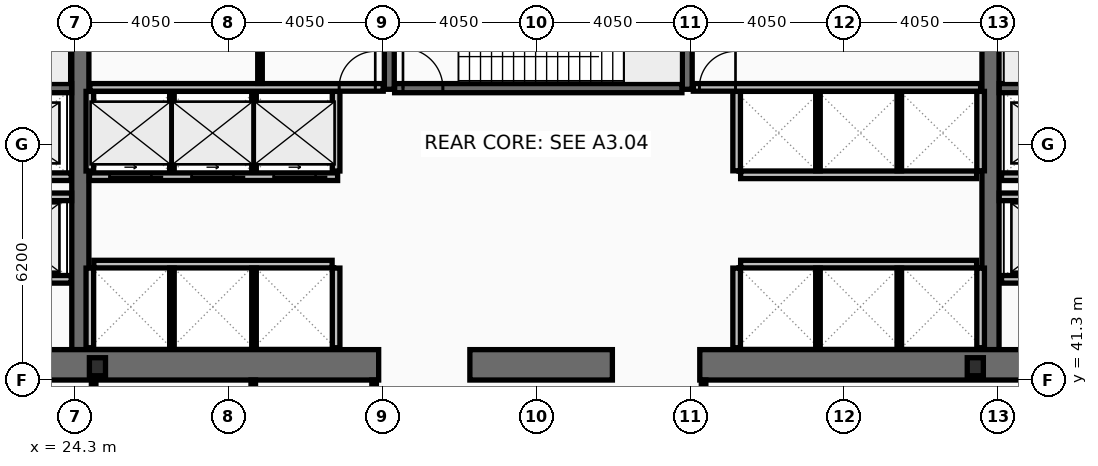
"""IFC4 building model, lengths in metres.
Left out: names, types, materials, properties, quantities, classifications, styles, units other than length and angle.
Written with IfcOpenShell. Run it as: python <this file> out.ifc"""

import sys

from ifc_helpers import new_model, si_unit, direction, frame, frame_2d, origin, origin_2d, place, context, subcontext, project, spatial, rectangle, i_section, extrude, element, fill, save


model = new_model("IFC4")
c1 = context("Model", 3, precision=1e-05, world=origin(), true_north=direction((0.0, 1.0)))
c2 = subcontext(c1, "Body", "Model", "MODEL_VIEW")
j1 = project(units=[si_unit("LENGTHUNIT", "METRE"), si_unit("PLANEANGLEUNIT", "RADIAN")], contexts=[c1])
p1 = place(None, origin())
s1 = spatial("IfcSite", under=j1, at=p1, CompositionType="ELEMENT")
p2 = place(p1, origin())
s2 = spatial("IfcBuilding", under=s1, at=p2, CompositionType="ELEMENT")
p3 = place(p2, frame((0.0, 0.0, 20.4)))
s3 = spatial("IfcBuildingStorey", under=s2, at=p3, CompositionType="ELEMENT", Elevation=20.4)
for number, where, z_axis, x_axis in (
    (1, (24.45, 42.1, 0.0), (0.0, 0.0, 1.0), (0.0, 1.0, 0.0)),
    (2, (48.4, 42.1, 0.0), (0.0, 0.0, 1.0), (0.0, 1.0, 0.0)),
):
    element("IfcWall", number, at=place(p3, frame(where, z_axis=z_axis, x_axis=x_axis)), inside=s3, PredefinedType="SHEAR", context=c2, shape_type="SweptSolid", body=[
        extrude(rectangle(XDim=10.8, YDim=0.45, at=frame_2d((5.4, 0.0))), origin(), (0.0, 0.0, 1.0), 5.22),
    ])
p4 = place(p3, frame((32.3, 41.7, 0.0), z_axis=(0.0, 0.0, 1.0), x_axis=(-1.0, 0.0, 0.0)))
e3 = element("IfcWall", 3, at=p4, inside=s3, PredefinedType="SHEAR", context=c2, shape_type="SweptSolid", body=[
    extrude(rectangle(XDim=11.45, YDim=0.8, at=frame_2d((5.725, 0.0))), origin(), (0.0, 0.0, 1.0), 5.22),
])
p5 = place(p3, frame((38.45, 41.7, 0.0), z_axis=(0.0, 0.0, 1.0), x_axis=(-1.0, 0.0, 0.0)))
e4 = element("IfcWall", 4, at=p5, inside=s3, PredefinedType="SHEAR", context=c2, shape_type="SweptSolid", body=[
    extrude(rectangle(XDim=3.75, YDim=0.8, at=frame_2d((1.875, 0.0))), origin(), (0.0, 0.0, 1.0), 5.22),
])
p6 = place(p3, frame((52.05, 41.7, 0.0), z_axis=(0.0, 0.0, 1.0), x_axis=(-1.0, 0.0, 0.0)))
e5 = element("IfcWall", 5, at=p6, inside=s3, PredefinedType="SHEAR", context=c2, shape_type="SweptSolid", body=[
    extrude(rectangle(XDim=11.3, YDim=0.8, at=frame_2d((5.65, 0.0))), origin(), (0.0, 0.0, 1.0), 5.22),
])
for number, where, z_axis, x_axis in (
    (6, (32.58, 48.95, 0.0), (0.0, 0.0, 1.0), (0.0, 1.0, 0.0)),
    (7, (40.42, 48.95, 0.0), (0.0, 0.0, 1.0), (0.0, 1.0, 0.0)),
):
    element("IfcWall", number, at=place(p3, frame(where, z_axis=z_axis, x_axis=x_axis)), inside=s3, PredefinedType="SHEAR", context=c2, shape_type="SweptSolid", body=[
        extrude(rectangle(XDim=3.95, YDim=0.26, at=frame_2d((1.975, 0.0))), origin(), (0.0, 0.0, 1.0), 5.22),
    ])
p7 = place(p3, frame((17.0, 48.98, 0.0), z_axis=(0.0, 0.0, 1.0), x_axis=(1.0, 0.0, 0.0)))
e8 = element("IfcWall", 8, at=p7, inside=s3, PredefinedType="SHEAR", context=c2, shape_type="SweptSolid", body=[
    extrude(rectangle(XDim=7.22, YDim=0.24, at=frame_2d((3.61, 0.0))), origin(), (0.0, 0.0, 1.0), 5.22),
])
p8 = place(p7, frame((0.22, 0.0, 0.0)))
e9 = element("IfcOpeningElement", 9, at=p8, cuts=e8, PredefinedType="OPENING", context=c2, shape_type="SweptSolid", body=[
    extrude(rectangle(XDim=1.05, YDim=2.15, at=frame_2d((0.525, 1.075))), frame((0.0, 0.13, 0.0), z_axis=(0.0, -1.0, 0.0), x_axis=(1.0, 0.0, 0.0)), (0.0, 0.0, 1.0), 0.26),
])
p9 = place(p3, frame((48.63, 48.98, 0.0), z_axis=(0.0, 0.0, 1.0), x_axis=(1.0, 0.0, 0.0)))
e10 = element("IfcWall", 10, at=p9, inside=s3, PredefinedType="SHEAR", context=c2, shape_type="SweptSolid", body=[
    extrude(rectangle(XDim=7.27, YDim=0.24, at=frame_2d((3.635, 0.0))), origin(), (0.0, 0.0, 1.0), 5.22),
])
p10 = place(p9, frame((6.0, 0.0, 0.0)))
e11 = element("IfcOpeningElement", 11, at=p10, cuts=e10, PredefinedType="OPENING", context=c2, shape_type="SweptSolid", body=[
    extrude(rectangle(XDim=1.05, YDim=2.15, at=frame_2d((0.525, 1.075))), frame((0.0, 0.13, 0.0), z_axis=(0.0, -1.0, 0.0), x_axis=(1.0, 0.0, 0.0)), (0.0, 0.0, 1.0), 0.26),
])
p11 = place(p3, frame((32.72, 48.98, 0.0), z_axis=(0.0, 0.0, 1.0), x_axis=(1.0, 0.0, 0.0)))
e12 = element("IfcWall", 12, at=p11, inside=s3, PredefinedType="SHEAR", context=c2, shape_type="SweptSolid", body=[
    extrude(rectangle(XDim=7.56, YDim=0.24, at=frame_2d((3.78, 0.0))), origin(), (0.0, 0.0, 1.0), 5.22),
])
p12 = place(p11, frame((0.22, 0.0, 0.0)))
e13 = element("IfcOpeningElement", 13, at=p12, cuts=e12, PredefinedType="OPENING", context=c2, shape_type="SweptSolid", body=[
    extrude(rectangle(XDim=1.05, YDim=2.15, at=frame_2d((0.525, 1.075))), frame((0.0, 0.13, 0.0), z_axis=(0.0, -1.0, 0.0), x_axis=(1.0, 0.0, 0.0)), (0.0, 0.0, 1.0), 0.26),
])
for number, where, z_axis, x_axis in (
    (14, (24.9, 41.65, 0.0), (0.0, 0.0, 1.0), (1.0, 0.0, 0.0)),
    (15, (48.0, 41.65, 0.0), (0.0, 0.0, 1.0), (1.0, 0.0, 0.0)),
):
    element("IfcColumn", number, at=place(p3, frame(where, z_axis=z_axis, x_axis=x_axis)), inside=s3, PredefinedType="COLUMN", context=c2, shape_type="SweptSolid", body=[
        extrude(i_section(OverallWidth=0.424, OverallDepth=0.474, WebThickness=0.048, FlangeThickness=0.077, at=origin_2d()), origin(), (0.0, 0.0, 1.0), 5.4),
    ])
p13 = place(p3, frame((51.61, 43.95, 0.0), z_axis=(0.0, 0.0, 1.0), x_axis=(-1.0, 0.0, 0.0)))
e16 = element("IfcWall", 16, at=p13, inside=s3, PredefinedType="PARTITIONING", context=c2, shape_type="SweptSolid", body=[
    extrude(rectangle(XDim=2.92, YDim=0.2, at=frame_2d((1.46, 0.0))), origin(), (0.0, 0.0, 1.0), 5.22),
])
p14 = place(p13, frame((0.81, 0.0, 0.0)))
e17 = element("IfcOpeningElement", 17, at=p14, cuts=e16, PredefinedType="OPENING", context=c2, shape_type="SweptSolid", body=[
    extrude(rectangle(XDim=1.3, YDim=2.18, at=frame_2d((0.65, 1.09))), frame((0.0, 0.11, 0.0), z_axis=(0.0, -1.0, 0.0), x_axis=(1.0, 0.0, 0.0)), (0.0, 0.0, 1.0), 0.22),
])
p15 = place(p3, frame((24.21, 43.95, 0.0), z_axis=(0.0, 0.0, 1.0), x_axis=(-1.0, 0.0, 0.0)))
e18 = element("IfcWall", 18, at=p15, inside=s3, PredefinedType="PARTITIONING", context=c2, shape_type="SweptSolid", body=[
    extrude(rectangle(XDim=2.97, YDim=0.2, at=frame_2d((1.485, 0.0))), origin(), (0.0, 0.0, 1.0), 5.22),
])
p16 = place(p15, frame((0.86, 0.0, 0.0)))
e19 = element("IfcOpeningElement", 19, at=p16, cuts=e18, PredefinedType="OPENING", context=c2, shape_type="SweptSolid", body=[
    extrude(rectangle(XDim=1.3, YDim=2.18, at=frame_2d((0.65, 1.09))), frame((0.0, 0.11, 0.0), z_axis=(0.0, -1.0, 0.0), x_axis=(1.0, 0.0, 0.0)), (0.0, 0.0, 1.0), 0.22),
])
p17 = place(p3, frame((51.61, 46.65, 0.0), z_axis=(0.0, 0.0, 1.0), x_axis=(-1.0, 0.0, 0.0)))
e20 = element("IfcWall", 20, at=p17, inside=s3, PredefinedType="PARTITIONING", context=c2, shape_type="SweptSolid", body=[
    extrude(rectangle(XDim=2.92, YDim=0.2, at=frame_2d((1.46, 0.0))), origin(), (0.0, 0.0, 1.0), 5.22),
])
p18 = place(p17, frame((0.86, 0.0, 0.0)))
e21 = element("IfcOpeningElement", 21, at=p18, cuts=e20, PredefinedType="OPENING", context=c2, shape_type="SweptSolid", body=[
    extrude(rectangle(XDim=1.2, YDim=2.18, at=frame_2d((0.6, 1.09))), frame((0.0, 0.11, 0.0), z_axis=(0.0, -1.0, 0.0), x_axis=(1.0, 0.0, 0.0)), (0.0, 0.0, 1.0), 0.22),
])
p19 = place(p3, frame((24.21, 46.65, 0.0), z_axis=(0.0, 0.0, 1.0), x_axis=(-1.0, 0.0, 0.0)))
e22 = element("IfcWall", 22, at=p19, inside=s3, PredefinedType="PARTITIONING", context=c2, shape_type="SweptSolid", body=[
    extrude(rectangle(XDim=2.97, YDim=0.2, at=frame_2d((1.485, 0.0))), origin(), (0.0, 0.0, 1.0), 5.22),
])
p20 = place(p19, frame((0.91, 0.0, 0.0)))
e23 = element("IfcOpeningElement", 23, at=p20, cuts=e22, PredefinedType="OPENING", context=c2, shape_type="SweptSolid", body=[
    extrude(rectangle(XDim=1.2, YDim=2.18, at=frame_2d((0.6, 1.09))), frame((0.0, 0.11, 0.0), z_axis=(0.0, -1.0, 0.0), x_axis=(1.0, 0.0, 0.0)), (0.0, 0.0, 1.0), 0.22),
])
p21 = place(p3, frame((31.22, 46.65, 0.0), z_axis=(0.0, 0.0, 1.0), x_axis=(-1.0, 0.0, 0.0)))
e24 = element("IfcWall", 24, at=p21, inside=s3, PredefinedType="PARTITIONING", context=c2, shape_type="SweptSolid", body=[
    extrude(rectangle(XDim=6.53, YDim=0.2, at=frame_2d((3.265, 0.0))), origin(), (0.0, 0.0, 1.0), 5.22),
])
p22 = place(p21, frame((4.9, 0.0, 0.0)))
e25 = element("IfcOpeningElement", 25, at=p22, cuts=e24, PredefinedType="OPENING", context=c2, shape_type="SweptSolid", body=[
    extrude(rectangle(XDim=1.1, YDim=2.18, at=frame_2d((0.55, 1.09))), frame((0.0, 0.11, 0.0), z_axis=(0.0, -1.0, 0.0), x_axis=(1.0, 0.0, 0.0)), (0.0, 0.0, 1.0), 0.22),
])
p23 = place(p21, frame((2.74, 0.0, 0.0)))
e26 = element("IfcOpeningElement", 26, at=p23, cuts=e24, PredefinedType="OPENING", context=c2, shape_type="SweptSolid", body=[
    extrude(rectangle(XDim=1.1, YDim=2.18, at=frame_2d((0.55, 1.09))), frame((0.0, 0.11, 0.0), z_axis=(0.0, -1.0, 0.0), x_axis=(1.0, 0.0, 0.0)), (0.0, 0.0, 1.0), 0.22),
])
p24 = place(p21, frame((0.58, 0.0, 0.0)))
e27 = element("IfcOpeningElement", 27, at=p24, cuts=e24, PredefinedType="OPENING", context=c2, shape_type="SweptSolid", body=[
    extrude(rectangle(XDim=1.1, YDim=2.18, at=frame_2d((0.55, 1.09))), frame((0.0, 0.11, 0.0), z_axis=(0.0, -1.0, 0.0), x_axis=(1.0, 0.0, 0.0)), (0.0, 0.0, 1.0), 0.22),
])
p25 = place(p3, frame((21.2, 46.12, 0.0), z_axis=(0.0, 0.0, 1.0), x_axis=(1.0, 0.0, 0.0)))
e28 = element("IfcWall", 28, at=p25, inside=s3, PredefinedType="PARTITIONING", context=c2, shape_type="SweptSolid", body=[
    extrude(rectangle(XDim=3.02, YDim=0.2, at=frame_2d((1.51, 0.0))), origin(), (0.0, 0.0, 1.0), 5.22),
])
p26 = place(p3, frame((48.63, 46.12, 0.0), z_axis=(0.0, 0.0, 1.0), x_axis=(1.0, 0.0, 0.0)))
e29 = element("IfcWall", 29, at=p26, inside=s3, PredefinedType="PARTITIONING", context=c2, shape_type="SweptSolid", body=[
    extrude(rectangle(XDim=3.07, YDim=0.2, at=frame_2d((1.535, 0.0))), origin(), (0.0, 0.0, 1.0), 5.22),
])
for number, where, z_axis, x_axis in (
    (30, (24.7, 46.8, 0.0), (0.0, 0.0, 1.0), (0.0, 1.0, 0.0)),
    (31, (31.18, 46.8, 0.0), (0.0, 0.0, 1.0), (0.0, 1.0, 0.0)),
):
    element("IfcWall", number, at=place(p3, frame(where, z_axis=z_axis, x_axis=x_axis)), inside=s3, PredefinedType="PARTITIONING", context=c2, shape_type="SweptSolid", body=[
        extrude(rectangle(XDim=2.095, YDim=0.2, at=frame_2d((1.047, 0.0))), origin(), (0.0, 0.0, 1.0), 5.22),
    ])
for number, where, z_axis, x_axis in (
    (32, (26.86, 46.8, 0.0), (0.0, 0.0, 1.0), (0.0, 1.0, 0.0)),
    (33, (29.02, 46.8, 0.0), (0.0, 0.0, 1.0), (0.0, 1.0, 0.0)),
):
    element("IfcWall", number, at=place(p3, frame(where, z_axis=z_axis, x_axis=x_axis)), inside=s3, PredefinedType="PARTITIONING", context=c2, shape_type="SweptSolid", body=[
        extrude(rectangle(XDim=2.095, YDim=0.12, at=frame_2d((1.047, 0.0))), origin(), (0.0, 0.0, 1.0), 5.22),
    ])
p27 = place(p3, frame((24.805, 44.35, 0.0), z_axis=(0.0, 0.0, 1.0), x_axis=(1.0, 0.0, 0.0)))
e34 = element("IfcWall", 34, at=p27, inside=s3, PredefinedType="PARTITIONING", context=c2, shape_type="SweptSolid", body=[
    extrude(rectangle(XDim=6.27, YDim=0.2, at=frame_2d((3.135, 0.0))), origin(), (0.0, 0.0, 1.0), 5.22),
])
for number, where, z_axis, x_axis in (
    (35, (24.7, 42.15, 0.0), (0.0, 0.0, 1.0), (0.0, 1.0, 0.0)),
    (36, (31.18, 42.15, 0.0), (0.0, 0.0, 1.0), (0.0, 1.0, 0.0)),
):
    element("IfcWall", number, at=place(p3, frame(where, z_axis=z_axis, x_axis=x_axis)), inside=s3, PredefinedType="PARTITIONING", context=c2, shape_type="SweptSolid", body=[
        extrude(rectangle(XDim=2.095, YDim=0.2, at=frame_2d((1.048, 0.0))), origin(), (0.0, 0.0, 1.0), 5.22),
    ])
for number, where, z_axis, x_axis in (
    (37, (26.86, 42.15, 0.0), (0.0, 0.0, 1.0), (0.0, 1.0, 0.0)),
    (38, (29.02, 42.15, 0.0), (0.0, 0.0, 1.0), (0.0, 1.0, 0.0)),
):
    element("IfcWall", number, at=place(p3, frame(where, z_axis=z_axis, x_axis=x_axis)), inside=s3, PredefinedType="PARTITIONING", context=c2, shape_type="SweptSolid", body=[
        extrude(rectangle(XDim=2.095, YDim=0.12, at=frame_2d((1.048, 0.0))), origin(), (0.0, 0.0, 1.0), 5.22),
    ])
p28 = place(p3, frame((41.825, 46.7, 0.0), z_axis=(0.0, 0.0, 1.0), x_axis=(1.0, 0.0, 0.0)))
e39 = element("IfcWall", 39, at=p28, inside=s3, PredefinedType="PARTITIONING", context=c2, shape_type="SweptSolid", body=[
    extrude(rectangle(XDim=6.21, YDim=0.2, at=frame_2d((3.105, 0.0))), origin(), (0.0, 0.0, 1.0), 5.22),
])
for number, where, z_axis, x_axis in (
    (40, (41.72, 46.805, 0.0), (0.0, 0.0, 1.0), (0.0, 1.0, 0.0)),
    (41, (48.14, 46.805, 0.0), (0.0, 0.0, 1.0), (0.0, 1.0, 0.0)),
):
    element("IfcWall", number, at=place(p3, frame(where, z_axis=z_axis, x_axis=x_axis)), inside=s3, PredefinedType="PARTITIONING", context=c2, shape_type="SweptSolid", body=[
        extrude(rectangle(XDim=2.09, YDim=0.2, at=frame_2d((1.045, 0.0))), origin(), (0.0, 0.0, 1.0), 5.22),
    ])
for number, where, z_axis, x_axis in (
    (42, (43.86, 46.805, 0.0), (0.0, 0.0, 1.0), (0.0, 1.0, 0.0)),
    (43, (46.0, 46.805, 0.0), (0.0, 0.0, 1.0), (0.0, 1.0, 0.0)),
):
    element("IfcWall", number, at=place(p3, frame(where, z_axis=z_axis, x_axis=x_axis)), inside=s3, PredefinedType="PARTITIONING", context=c2, shape_type="SweptSolid", body=[
        extrude(rectangle(XDim=2.09, YDim=0.12, at=frame_2d((1.045, 0.0))), origin(), (0.0, 0.0, 1.0), 5.22),
    ])
p29 = place(p3, frame((41.825, 44.35, 0.0), z_axis=(0.0, 0.0, 1.0), x_axis=(1.0, 0.0, 0.0)))
e44 = element("IfcWall", 44, at=p29, inside=s3, PredefinedType="PARTITIONING", context=c2, shape_type="SweptSolid", body=[
    extrude(rectangle(XDim=6.21, YDim=0.2, at=frame_2d((3.105, 0.0))), origin(), (0.0, 0.0, 1.0), 5.22),
])
for number, where, z_axis, x_axis in (
    (45, (41.72, 42.15, 0.0), (0.0, 0.0, 1.0), (0.0, 1.0, 0.0)),
    (46, (48.14, 42.15, 0.0), (0.0, 0.0, 1.0), (0.0, 1.0, 0.0)),
):
    element("IfcWall", number, at=place(p3, frame(where, z_axis=z_axis, x_axis=x_axis)), inside=s3, PredefinedType="PARTITIONING", context=c2, shape_type="SweptSolid", body=[
        extrude(rectangle(XDim=2.095, YDim=0.2, at=frame_2d((1.048, 0.0))), origin(), (0.0, 0.0, 1.0), 5.22),
    ])
for number, where, z_axis, x_axis in (
    (47, (43.86, 42.15, 0.0), (0.0, 0.0, 1.0), (0.0, 1.0, 0.0)),
    (48, (46.0, 42.15, 0.0), (0.0, 0.0, 1.0), (0.0, 1.0, 0.0)),
):
    element("IfcWall", number, at=place(p3, frame(where, z_axis=z_axis, x_axis=x_axis)), inside=s3, PredefinedType="PARTITIONING", context=c2, shape_type="SweptSolid", body=[
        extrude(rectangle(XDim=2.095, YDim=0.12, at=frame_2d((1.048, 0.0))), origin(), (0.0, 0.0, 1.0), 5.22),
    ])
p30 = place(p3, frame((24.7, 49.0, 0.0), z_axis=(0.0, 0.0, 1.0), x_axis=(1.0, 0.0, 0.0)))
e49 = element("IfcWall", 49, at=p30, inside=s3, PredefinedType="PARTITIONING", context=c2, shape_type="SweptSolid", body=[
    extrude(rectangle(XDim=7.72, YDim=0.2, at=frame_2d((3.86, 0.0))), origin(), (0.0, 0.0, 1.0), 5.22),
])
p31 = place(p30, frame((6.56, 0.0, 0.0)))
e50 = element("IfcOpeningElement", 50, at=p31, cuts=e49, PredefinedType="OPENING", context=c2, shape_type="SweptSolid", body=[
    extrude(rectangle(XDim=0.95, YDim=2.1, at=frame_2d((0.475, 1.05))), frame((0.0, 0.11, 0.0), z_axis=(0.0, -1.0, 0.0), x_axis=(1.0, 0.0, 0.0)), (0.0, 0.0, 1.0), 0.22),
])
p32 = place(p3, frame((29.177, 49.105, 0.0), z_axis=(0.0, 0.0, 1.0), x_axis=(0.0, 1.0, 0.0)))
e51 = element("IfcWall", 51, at=p32, inside=s3, PredefinedType="PARTITIONING", context=c2, shape_type="SweptSolid", body=[
    extrude(rectangle(XDim=3.69, YDim=0.12, at=frame_2d((1.845, 0.0))), origin(), (0.0, 0.0, 1.0), 5.22),
])
p33 = place(p32, frame((1.05, 0.0, 0.0)))
e52 = element("IfcOpeningElement", 52, at=p33, cuts=e51, PredefinedType="OPENING", context=c2, shape_type="SweptSolid", body=[
    extrude(rectangle(XDim=0.9, YDim=2.05, at=frame_2d((0.45, 1.025))), frame((0.0, 0.07, 0.0), z_axis=(0.0, -1.0, 0.0), x_axis=(1.0, 0.0, 0.0)), (0.0, 0.0, 1.0), 0.14),
])
p34 = place(p3, frame((40.58, 49.0, 0.0), z_axis=(0.0, 0.0, 1.0), x_axis=(1.0, 0.0, 0.0)))
e53 = element("IfcWall", 53, at=p34, inside=s3, PredefinedType="PARTITIONING", context=c2, shape_type="SweptSolid", body=[
    extrude(rectangle(XDim=7.56, YDim=0.2, at=frame_2d((3.78, 0.0))), origin(), (0.0, 0.0, 1.0), 5.22),
])
p35 = place(p34, frame((0.16, 0.0, 0.0)))
e54 = element("IfcOpeningElement", 54, at=p35, cuts=e53, PredefinedType="OPENING", context=c2, shape_type="SweptSolid", body=[
    extrude(rectangle(XDim=0.95, YDim=2.1, at=frame_2d((0.475, 1.05))), frame((0.0, 0.11, 0.0), z_axis=(0.0, -1.0, 0.0), x_axis=(1.0, 0.0, 0.0)), (0.0, 0.0, 1.0), 0.22),
])
p36 = place(p3, frame((24.8, 38.28, 0.0), z_axis=(0.0, 0.0, 1.0), x_axis=(0.0, 1.0, 0.0)))
e55 = element("IfcWall", 55, at=p36, inside=s3, PredefinedType="PARTITIONING", context=c2, shape_type="SweptSolid", body=[
    extrude(rectangle(XDim=3.02, YDim=0.12, at=frame_2d((1.51, 0.0))), origin(), (0.0, 0.0, 1.0), 4.41),
])
for number, where, z_axis, x_axis in (
    (56, (29.0, 38.28, 0.0), (0.0, 0.0, 1.0), (0.0, 1.0, 0.0)),
    (57, (32.18, 38.28, 0.0), (0.0, 0.0, 1.0), (0.0, 1.0, 0.0)),
    (58, (40.85, 38.28, 0.0), (0.0, 0.0, 1.0), (0.0, 1.0, 0.0)),
):
    element("IfcWall", number, at=place(p3, frame(where, z_axis=z_axis, x_axis=x_axis)), inside=s3, PredefinedType="PARTITIONING", context=c2, shape_type="SweptSolid", body=[
        extrude(rectangle(XDim=3.02, YDim=0.12, at=frame_2d((1.51, 0.0))), origin(), (0.0, 0.0, 1.0), 5.22),
    ])
p37 = place(p12, origin())
e59 = element("IfcDoor", 59, at=p37, inside=s3, OperationType="SINGLE_SWING_LEFT", PredefinedType="DOOR", context=c2, shape_type="SweptSolid", body=[
    extrude(rectangle(XDim=1.05, YDim=2.15, at=frame_2d((0.525, 1.075))), frame((0.0, 0.025, 0.0), z_axis=(0.0, -1.0, 0.0), x_axis=(1.0, 0.0, 0.0)), (0.0, 0.0, 1.0), 0.05),
])
fill(e13, e59)
p38 = place(p22, origin())
e60 = element("IfcDoor", 60, at=p38, inside=s3, OperationType="SLIDING_TO_LEFT", PredefinedType="DOOR", context=c2, shape_type="SweptSolid", body=[
    extrude(rectangle(XDim=1.1, YDim=2.18, at=frame_2d((0.55, 1.09))), frame((0.0, 0.025, 0.0), z_axis=(0.0, -1.0, 0.0), x_axis=(1.0, 0.0, 0.0)), (0.0, 0.0, 1.0), 0.05),
])
fill(e25, e60)
p39 = place(p23, origin())
e61 = element("IfcDoor", 61, at=p39, inside=s3, OperationType="SLIDING_TO_LEFT", PredefinedType="DOOR", context=c2, shape_type="SweptSolid", body=[
    extrude(rectangle(XDim=1.1, YDim=2.18, at=frame_2d((0.55, 1.09))), frame((0.0, 0.025, 0.0), z_axis=(0.0, -1.0, 0.0), x_axis=(1.0, 0.0, 0.0)), (0.0, 0.0, 1.0), 0.05),
])
fill(e26, e61)
p40 = place(p24, origin())
e62 = element("IfcDoor", 62, at=p40, inside=s3, OperationType="SLIDING_TO_LEFT", PredefinedType="DOOR", context=c2, shape_type="SweptSolid", body=[
    extrude(rectangle(XDim=1.1, YDim=2.18, at=frame_2d((0.55, 1.09))), frame((0.0, 0.025, 0.0), z_axis=(0.0, -1.0, 0.0), x_axis=(1.0, 0.0, 0.0)), (0.0, 0.0, 1.0), 0.05),
])
fill(e27, e62)
p41 = place(p31, origin())
e63 = element("IfcDoor", 63, at=p41, inside=s3, OperationType="SINGLE_SWING_RIGHT", PredefinedType="DOOR", context=c2, shape_type="SweptSolid", body=[
    extrude(rectangle(XDim=0.95, YDim=2.1, at=frame_2d((0.475, 1.05))), frame((0.0, 0.025, 0.0), z_axis=(0.0, -1.0, 0.0), x_axis=(1.0, 0.0, 0.0)), (0.0, 0.0, 1.0), 0.05),
])
fill(e50, e63)
p42 = place(p35, origin())
e64 = element("IfcDoor", 64, at=p42, inside=s3, OperationType="SINGLE_SWING_RIGHT", PredefinedType="DOOR", context=c2, shape_type="SweptSolid", body=[
    extrude(rectangle(XDim=0.95, YDim=2.1, at=frame_2d((0.475, 1.05))), frame((0.0, 0.025, 0.0), z_axis=(0.0, -1.0, 0.0), x_axis=(1.0, 0.0, 0.0)), (0.0, 0.0, 1.0), 0.05),
])
fill(e54, e64)
save(model, sys.argv[1])
